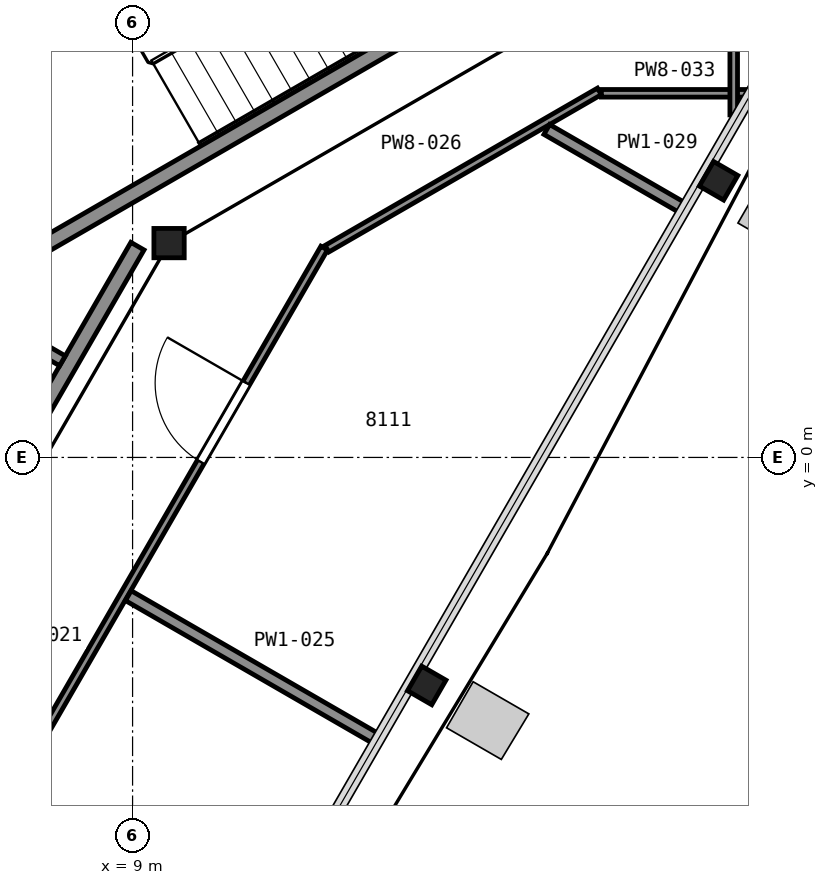
"""IFC4 building model, lengths in metres.
Left out: names, types, materials, properties, quantities, classifications, styles, units other than length and angle.
Written with IfcOpenShell. Run it as: python <this file> out.ifc"""

import sys

from ifc_helpers import new_model, si_unit, direction, frame, frame_2d, origin, origin_2d, place, context, subcontext, project, spatial, rectangle, i_section, extrude, element, fill, save


model = new_model("IFC4")
c1 = context("Model", 3, precision=1e-05, world=origin(), true_north=direction((0.0, 1.0)))
c2 = subcontext(c1, "Body", "Model", "MODEL_VIEW")
j1 = project(units=[si_unit("LENGTHUNIT", "METRE"), si_unit("PLANEANGLEUNIT", "RADIAN")], contexts=[c1])
p1 = place(None, origin())
s1 = spatial("IfcSite", under=j1, at=p1, CompositionType="ELEMENT")
p2 = place(p1, origin())
s2 = spatial("IfcBuilding", under=s1, at=p2, CompositionType="ELEMENT")
p3 = place(p2, frame((0.0, 0.0, 321.0)))
s3 = spatial("IfcBuildingStorey", under=s2, at=p3, CompositionType="ELEMENT", Elevation=321.0)
for number, where, z_axis, x_axis in (
    (1, (12.87, -3.0, 0.0), (0.0, 0.0, 1.0), (-0.5, -0.866, 0.0)),
    (2, (16.71, 3.64, 0.0), (0.0, 0.0, 1.0), (-0.5, -0.866, 0.0)),
):
    element("IfcColumn", number, at=place(p3, frame(where, z_axis=z_axis, x_axis=x_axis)), inside=s3, PredefinedType="COLUMN", context=c2, shape_type="SweptSolid", body=[
        extrude(i_section(OverallWidth=0.373, OverallDepth=0.368, WebThickness=0.015, FlangeThickness=0.024, FilletRadius=0.015, at=origin_2d()), origin(), (0.0, 0.0, 1.0), 4.2),
    ])
p4 = place(p3, frame((9.48, 2.82, 0.0), z_axis=(0.0, 0.0, 1.0), x_axis=(1.0, 0.0, 0.0)))
e3 = element("IfcColumn", 3, at=p4, inside=s3, PredefinedType="COLUMN", context=c2, shape_type="SweptSolid", body=[
    extrude(i_section(OverallWidth=0.399, OverallDepth=0.386, WebThickness=0.021, FlangeThickness=0.033, FilletRadius=0.015, at=origin_2d()), origin(), (0.0, 0.0, 1.0), 4.2),
])
for number, where, z_axis, x_axis in (
    (4, (6.178, 5.299, 0.0), (0.0, 0.0, 1.0), (0.866, 0.5, 0.0)),
    (5, (7.678, 2.701, 0.0), (0.0, 0.0, 1.0), (0.866, 0.5, 0.0)),
):
    element("IfcWall", number, at=place(p3, frame(where, z_axis=z_axis, x_axis=x_axis)), inside=s3, PredefinedType="PARTITIONING", context=c2, shape_type="SweptSolid", body=[
        extrude(rectangle(XDim=7.2, YDim=0.2, at=frame_2d((3.6, 0.0))), origin(), (0.0, 0.0, 1.0), 3.95),
    ])
p5 = place(p3, frame((2.552, -8.5, 0.0), z_axis=(0.0, 0.0, 1.0), x_axis=(0.499967462014, 0.866044188784, 0.0)))
e6 = element("IfcWall", 6, at=p5, inside=s3, PredefinedType="PARTITIONING", context=c2, shape_type="SweptSolid", body=[
    extrude(rectangle(XDim=13.025, YDim=0.2, at=frame_2d((6.512, 0.0))), origin(), (0.0, 0.0, 1.0), 3.95),
])
p6 = place(p3, frame((6.151, 2.384, 0.0), z_axis=(0.0, 0.0, 1.0), x_axis=(0.865971748, -0.500092923031, 0.0)))
e7 = element("IfcWall", 7, at=p6, inside=s3, PredefinedType="PARTITIONING", context=c2, shape_type="SweptSolid", body=[
    extrude(rectangle(XDim=2.225, YDim=0.15, at=frame_2d((1.112, 0.0))), origin(), (0.0, 0.0, 1.0), 3.95),
])
p7 = place(p3, frame((11.521, 2.754, 0.0), z_axis=(0.0, 0.0, 1.0), x_axis=(-0.500044034969, -0.86599997869, 0.0)))
e8 = element("IfcWall", 8, at=p7, inside=s3, PredefinedType="PARTITIONING", context=c2, shape_type="SweptSolid", body=[
    extrude(rectangle(XDim=15.553, YDim=0.1, at=frame_2d((7.776, 0.0))), origin(), (0.0, 0.0, 1.0), 3.297),
])
p8 = place(p7, frame((13.803, 0.0, 0.0)))
e9 = element("IfcOpeningElement", 9, at=p8, cuts=e8, PredefinedType="OPENING", context=c2, shape_type="SweptSolid", body=[
    extrude(rectangle(XDim=1.2, YDim=2.1, at=frame_2d((0.6, 1.05))), frame((0.0, 0.06, 0.0), z_axis=(0.0, -1.0, 0.0), x_axis=(1.0, 0.0, 0.0)), (0.0, 0.0, 1.0), 0.12),
])
p9 = place(p7, frame((8.665, 0.0, 0.0)))
e10 = element("IfcOpeningElement", 10, at=p9, cuts=e8, PredefinedType="OPENING", context=c2, shape_type="SweptSolid", body=[
    extrude(rectangle(XDim=1.2, YDim=2.1, at=frame_2d((0.6, 1.05))), frame((0.0, 0.06, 0.0), z_axis=(0.0, -1.0, 0.0), x_axis=(1.0, 0.0, 0.0)), (0.0, 0.0, 1.0), 0.12),
])
p10 = place(p7, frame((2.049, 0.0, 0.0)))
e11 = element("IfcOpeningElement", 11, at=p10, cuts=e8, PredefinedType="OPENING", context=c2, shape_type="SweptSolid", body=[
    extrude(rectangle(XDim=1.2, YDim=2.1, at=frame_2d((0.6, 1.05))), frame((0.0, 0.06, 0.0), z_axis=(0.0, -1.0, 0.0), x_axis=(1.0, 0.0, 0.0)), (0.0, 0.0, 1.0), 0.12),
])
p11 = place(p3, frame((8.944, -1.819, 0.0), z_axis=(0.0, 0.0, 1.0), x_axis=(0.865987581393, -0.500065504582, 0.0)))
e12 = element("IfcWall", 12, at=p11, inside=s3, PredefinedType="PARTITIONING", context=c2, shape_type="SweptSolid", body=[
    extrude(rectangle(XDim=3.778, YDim=0.15, at=frame_2d((1.889, 0.0))), origin(), (0.0, 0.0, 1.0), 3.297),
])
p12 = place(p3, frame((11.557, 2.746, 0.0), z_axis=(0.0, 0.0, 1.0), x_axis=(0.866005840187, 0.500033883614, 0.0)))
e13 = element("IfcWall", 13, at=p12, inside=s3, PredefinedType="PARTITIONING", context=c2, shape_type="SweptSolid", body=[
    extrude(rectangle(XDim=4.139, YDim=0.1, at=frame_2d((2.07, 0.0))), origin(), (0.0, 0.0, 1.0), 3.297),
])
p13 = place(p3, frame((14.449, 4.315, 0.0), z_axis=(0.0, 0.0, 1.0), x_axis=(0.865991778511, -0.500058236159, 0.0)))
e14 = element("IfcWall", 14, at=p13, inside=s3, PredefinedType="PARTITIONING", context=c2, shape_type="SweptSolid", body=[
    extrude(rectangle(XDim=2.077, YDim=0.15, at=frame_2d((1.039, 0.0))), origin(), (0.0, 0.0, 1.0), 3.297),
])
p14 = place(p3, frame((15.168, 4.791, 0.0), z_axis=(0.0, 0.0, 1.0), x_axis=(1.0, 0.0, 0.0)))
e15 = element("IfcWall", 15, at=p14, inside=s3, PredefinedType="PARTITIONING", context=c2, shape_type="SweptSolid", body=[
    extrude(rectangle(XDim=1.926, YDim=0.1, at=frame_2d((0.963, 0.0))), origin(), (0.0, 0.0, 1.0), 3.297),
])
p15 = place(p3, frame((16.909, 4.507, 0.0), z_axis=(0.0, 0.0, 1.0), x_axis=(0.0, 1.0, 0.0)))
e16 = element("IfcWall", 16, at=p15, inside=s3, PredefinedType="PARTITIONING", context=c2, shape_type="SweptSolid", body=[
    extrude(rectangle(XDim=3.272, YDim=0.1, at=frame_2d((1.636, 0.0))), origin(), (0.0, 0.0, 1.0), 3.297),
])
p16 = place(p10, origin())
e17 = element("IfcDoor", 17, at=p16, inside=s3, OperationType="SINGLE_SWING_LEFT", PredefinedType="DOOR", context=c2, shape_type="SweptSolid", body=[
    extrude(rectangle(XDim=1.2, YDim=2.1, at=frame_2d((0.6, 1.05))), frame((0.0, 0.025, 0.0), z_axis=(0.0, -1.0, 0.0), x_axis=(1.0, 0.0, 0.0)), (0.0, 0.0, 1.0), 0.05),
])
fill(e11, e17)
save(model, sys.argv[1])
